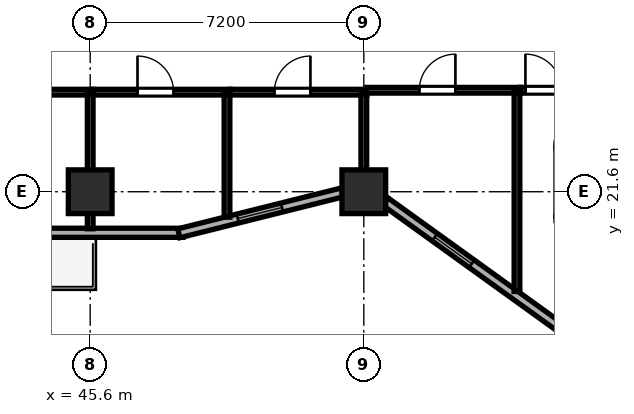
"""IFC4 building model, lengths in metres.
Left out: names, types, materials, properties, quantities, classifications, styles, units other than length and angle.
Written with IfcOpenShell. Run it as: python <this file> out.ifc"""

import sys

from ifc_helpers import new_model, si_unit, direction, frame, frame_2d, origin, origin_2d, place, context, subcontext, project, spatial, rectangle, hollow_rectangle, extrude, element, fill, save


model = new_model("IFC4")
c1 = context("Model", 3, precision=1e-05, world=origin(), true_north=direction((0.0, 1.0)))
c2 = subcontext(c1, "Body", "Model", "MODEL_VIEW")
j1 = project(units=[si_unit("LENGTHUNIT", "METRE"), si_unit("PLANEANGLEUNIT", "RADIAN")], contexts=[c1])
p1 = place(None, origin())
s1 = spatial("IfcSite", under=j1, at=p1, CompositionType="ELEMENT")
p2 = place(p1, origin())
s2 = spatial("IfcBuilding", under=s1, at=p2, CompositionType="ELEMENT")
p3 = place(p2, frame((0.0, 0.0, 47.6)))
s3 = spatial("IfcBuildingStorey", under=s2, at=p3, CompositionType="ELEMENT", Elevation=47.6)
for number, where, z_axis, x_axis in (
    (1, (52.8, 21.6, 0.0), (0.0, 0.0, 1.0), (1.0, 0.0, 0.0)),
    (2, (45.6, 21.6, 0.0), (0.0, 0.0, 1.0), (1.0, 0.0, 0.0)),
):
    element("IfcColumn", number, at=place(p3, frame(where, z_axis=z_axis, x_axis=x_axis)), inside=s3, PredefinedType="COLUMN", context=c2, shape_type="SweptSolid", body=[
        extrude(hollow_rectangle(XDim=1.15, YDim=1.15, WallThickness=0.042, at=origin_2d()), origin(), (0.0, 0.0, 1.0), 3.8),
    ])
p4 = place(p3, frame((28.76, 20.52, 0.0), z_axis=(0.0, 0.0, 1.0), x_axis=(1.0, 0.0, 0.0)))
e3 = element("IfcWall", 3, at=p4, inside=s3, PredefinedType="SOLIDWALL", context=c2, shape_type="SweptSolid", body=[
    extrude(rectangle(XDim=19.281, YDim=0.24, at=frame_2d((9.64, 0.0))), origin(), (0.0, 0.0, 1.0), 3.6),
])
p5 = place(p4, frame((15.64, 0.0, 0.0), z_axis=(0.0, 0.0, 1.0), x_axis=(-1.0, 0.0, 0.0)))
e4 = element("IfcOpeningElement", 4, at=p5, cuts=e3, PredefinedType="OPENING", context=c2, shape_type="SweptSolid", body=[
    extrude(rectangle(XDim=1.2, YDim=2.15, at=frame_2d((0.6, 1.075))), frame((0.0, 0.13, 0.0), z_axis=(0.0, -1.0, 0.0), x_axis=(1.0, 0.0, 0.0)), (0.0, 0.0, 1.0), 0.26),
])
p6 = place(p3, frame((47.932, 20.507, 0.0), z_axis=(0.0, 0.0, 1.0), x_axis=(0.970145739396, 0.242522667667, 0.0)))
e5 = element("IfcWall", 5, at=p6, inside=s3, PredefinedType="SOLIDWALL", context=c2, shape_type="SweptSolid", body=[
    extrude(rectangle(XDim=4.433, YDim=0.24, at=frame_2d((2.217, 0.0))), origin(), (0.0, 0.0, 1.0), 3.097),
])
p7 = place(p6, frame((1.6, 0.0, 0.85)))
e6 = element("IfcOpeningElement", 6, at=p7, cuts=e5, PredefinedType="OPENING", context=c2, shape_type="SweptSolid", body=[
    extrude(rectangle(XDim=1.2, YDim=1.85, at=frame_2d((0.6, 0.925))), frame((0.0, 0.13, 0.0), z_axis=(0.0, -1.0, 0.0), x_axis=(1.0, 0.0, 0.0)), (0.0, 0.0, 1.0), 0.26),
])
p8 = place(p3, frame((53.367, 21.34, 0.0), z_axis=(0.0, 0.0, 1.0), x_axis=(0.811543176492, -0.58429245476, 0.0)))
e7 = element("IfcWall", 7, at=p8, inside=s3, PredefinedType="SOLIDWALL", context=c2, shape_type="SweptSolid", body=[
    extrude(rectangle(XDim=11.531, YDim=0.24, at=frame_2d((5.765, 0.0))), origin(), (0.0, 0.0, 1.0), 3.097),
])
p9 = place(p8, frame((1.6, 0.0, 0.85)))
e8 = element("IfcOpeningElement", 8, at=p9, cuts=e7, PredefinedType="OPENING", context=c2, shape_type="SweptSolid", body=[
    extrude(rectangle(XDim=1.2, YDim=1.85, at=frame_2d((0.6, 0.925))), frame((0.0, 0.13, 0.0), z_axis=(0.0, -1.0, 0.0), x_axis=(1.0, 0.0, 0.0)), (0.0, 0.0, 1.0), 0.26),
])
p10 = place(p8, frame((7.0, 0.0, 0.85)))
e9 = element("IfcOpeningElement", 9, at=p10, cuts=e7, PredefinedType="OPENING", context=c2, shape_type="SweptSolid", body=[
    extrude(rectangle(XDim=1.2, YDim=1.85, at=frame_2d((0.6, 0.925))), frame((0.0, 0.13, 0.0), z_axis=(0.0, -1.0, 0.0), x_axis=(1.0, 0.0, 0.0)), (0.0, 0.0, 1.0), 0.26),
])
p11 = place(p8, frame((9.762, 0.0, 0.85)))
e10 = element("IfcOpeningElement", 10, at=p11, cuts=e7, PredefinedType="OPENING", context=c2, shape_type="SweptSolid", body=[
    extrude(rectangle(XDim=1.2, YDim=1.85, at=frame_2d((0.6, 0.925))), frame((0.0, 0.13, 0.0), z_axis=(0.0, -1.0, 0.0), x_axis=(1.0, 0.0, 0.0)), (0.0, 0.0, 1.0), 0.26),
])
p12 = place(p3, frame((39.882, 24.22, 0.0), z_axis=(0.0, 0.0, 1.0), x_axis=(1.0, 0.0, 0.0)))
e11 = element("IfcWall", 11, at=p12, inside=s3, PredefinedType="PARTITIONING", context=c2, shape_type="SweptSolid", body=[
    extrude(rectangle(XDim=5.798, YDim=0.15, at=frame_2d((2.899, 0.0))), origin(), (0.0, 0.0, 1.0), 3.6),
])
p13 = place(p12, frame((3.213, 0.0, 0.0), z_axis=(0.0, 0.0, 1.0), x_axis=(-1.0, 0.0, 0.0)))
e12 = element("IfcOpeningElement", 12, at=p13, cuts=e11, PredefinedType="OPENING", context=c2, shape_type="SweptSolid", body=[
    extrude(rectangle(XDim=0.95, YDim=2.12, at=frame_2d((0.475, 1.06))), frame((0.0, 0.085, 0.0), z_axis=(0.0, -1.0, 0.0), x_axis=(1.0, 0.0, 0.0)), (0.0, 0.0, 1.0), 0.17),
])
p14 = place(p3, frame((45.6, 20.625, 0.0), z_axis=(0.0, 0.0, 1.0), x_axis=(0.0, 1.0, 0.0)))
e13 = element("IfcWall", 13, at=p14, inside=s3, PredefinedType="PARTITIONING", context=c2, shape_type="SweptSolid", body=[
    extrude(rectangle(XDim=3.535, YDim=0.15, at=frame_2d((1.768, 0.0))), origin(), (0.0, 0.0, 1.0), 2.985),
])
p15 = place(p3, frame((45.682, 24.22, 0.0), z_axis=(0.0, 0.0, 1.0), x_axis=(1.0, 0.0, 0.0)))
e14 = element("IfcWall", 14, at=p15, inside=s3, PredefinedType="PARTITIONING", context=c2, shape_type="SweptSolid", body=[
    extrude(rectangle(XDim=3.598, YDim=0.15, at=frame_2d((1.799, 0.0))), origin(), (0.0, 0.0, 1.0), 3.6),
])
p16 = place(p15, frame((2.113, 0.0, 0.0), z_axis=(0.0, 0.0, 1.0), x_axis=(-1.0, 0.0, 0.0)))
e15 = element("IfcOpeningElement", 15, at=p16, cuts=e14, PredefinedType="OPENING", context=c2, shape_type="SweptSolid", body=[
    extrude(rectangle(XDim=0.95, YDim=2.12, at=frame_2d((0.475, 1.06))), frame((0.0, 0.085, 0.0), z_axis=(0.0, -1.0, 0.0), x_axis=(1.0, 0.0, 0.0)), (0.0, 0.0, 1.0), 0.17),
])
p17 = place(p3, frame((49.2, 20.932, 0.0), z_axis=(0.0, 0.0, 1.0), x_axis=(0.0, 1.0, 0.0)))
e16 = element("IfcWall", 16, at=p17, inside=s3, PredefinedType="PARTITIONING", context=c2, shape_type="SweptSolid", body=[
    extrude(rectangle(XDim=3.228, YDim=0.15, at=frame_2d((1.614, 0.0))), origin(), (0.0, 0.0, 1.0), 3.6),
])
p18 = place(p3, frame((49.282, 24.22, 0.0), z_axis=(0.0, 0.0, 1.0), x_axis=(1.0, 0.0, 0.0)))
e17 = element("IfcWall", 17, at=p18, inside=s3, PredefinedType="PARTITIONING", context=c2, shape_type="SweptSolid", body=[
    extrude(rectangle(XDim=3.598, YDim=0.15, at=frame_2d((1.799, 0.0))), origin(), (0.0, 0.0, 1.0), 3.6),
])
p19 = place(p18, frame((2.113, 0.0, 0.0), z_axis=(0.0, 0.0, 1.0), x_axis=(-1.0, 0.0, 0.0)))
e18 = element("IfcOpeningElement", 18, at=p19, cuts=e17, PredefinedType="OPENING", context=c2, shape_type="SweptSolid", body=[
    extrude(rectangle(XDim=0.95, YDim=2.12, at=frame_2d((0.475, 1.06))), frame((0.0, 0.085, 0.0), z_axis=(0.0, -1.0, 0.0), x_axis=(1.0, 0.0, 0.0)), (0.0, 0.0, 1.0), 0.17),
])
p20 = place(p3, frame((52.8, 21.819, 0.0), z_axis=(0.0, 0.0, 1.0), x_axis=(0.0, 1.0, 0.0)))
e19 = element("IfcWall", 19, at=p20, inside=s3, PredefinedType="PARTITIONING", context=c2, shape_type="SweptSolid", body=[
    extrude(rectangle(XDim=2.341, YDim=0.15, at=frame_2d((1.171, 0.0))), origin(), (0.0, 0.0, 1.0), 3.097),
])
p21 = place(p3, frame((52.882, 24.27, 0.0), z_axis=(0.0, 0.0, 1.0), x_axis=(1.0, 0.0, 0.0)))
e20 = element("IfcWall", 20, at=p21, inside=s3, PredefinedType="PARTITIONING", context=c2, shape_type="SweptSolid", body=[
    extrude(rectangle(XDim=4.028, YDim=0.15, at=frame_2d((2.014, 0.0))), origin(), (0.0, 0.0, 1.0), 3.6),
])
p22 = place(p21, frame((2.328, 0.0, 0.0), z_axis=(0.0, 0.0, 1.0), x_axis=(-1.0, 0.0, 0.0)))
e21 = element("IfcOpeningElement", 21, at=p22, cuts=e20, PredefinedType="OPENING", context=c2, shape_type="SweptSolid", body=[
    extrude(rectangle(XDim=0.95, YDim=2.12, at=frame_2d((0.475, 1.06))), frame((0.0, 0.085, 0.0), z_axis=(0.0, -1.0, 0.0), x_axis=(1.0, 0.0, 0.0)), (0.0, 0.0, 1.0), 0.17),
])
p23 = place(p3, frame((56.83, 18.976, 0.0), z_axis=(0.0, 0.0, 1.0), x_axis=(0.0, 1.0, 0.0)))
e22 = element("IfcWall", 22, at=p23, inside=s3, PredefinedType="PARTITIONING", context=c2, shape_type="SweptSolid", body=[
    extrude(rectangle(XDim=5.234, YDim=0.15, at=frame_2d((2.617, 0.0))), origin(), (0.0, 0.0, 1.0), 3.6),
])
p24 = place(p3, frame((56.912, 24.27, 0.0), z_axis=(0.0, 0.0, 1.0), x_axis=(1.0, 0.0, 0.0)))
e23 = element("IfcWall", 23, at=p24, inside=s3, PredefinedType="PARTITIONING", context=c2, shape_type="SweptSolid", body=[
    extrude(rectangle(XDim=4.158, YDim=0.15, at=frame_2d((2.079, 0.0))), origin(), (0.0, 0.0, 1.0), 3.6),
])
p25 = place(p24, frame((1.09, 0.0, 0.0), z_axis=(0.0, 0.0, 1.0), x_axis=(-1.0, 0.0, 0.0)))
e24 = element("IfcOpeningElement", 24, at=p25, cuts=e23, PredefinedType="OPENING", context=c2, shape_type="SweptSolid", body=[
    extrude(rectangle(XDim=0.95, YDim=2.15, at=frame_2d((0.475, 1.075))), frame((0.0, 0.085, 0.0), z_axis=(0.0, -1.0, 0.0), x_axis=(1.0, 0.0, 0.0)), (0.0, 0.0, 1.0), 0.17),
])
p26 = place(p7, origin())
e25 = element("IfcWindow", 25, at=p26, inside=s3, PartitioningType="SINGLE_PANEL", PredefinedType="WINDOW", context=c2, shape_type="SweptSolid", body=[
    extrude(rectangle(XDim=1.2, YDim=1.85, at=frame_2d((0.6, 0.925))), frame((0.0, 0.03, 0.0), z_axis=(0.0, -1.0, 0.0), x_axis=(1.0, 0.0, 0.0)), (0.0, 0.0, 1.0), 0.06),
])
fill(e6, e25)
p27 = place(p9, origin())
e26 = element("IfcWindow", 26, at=p27, inside=s3, PartitioningType="SINGLE_PANEL", PredefinedType="WINDOW", context=c2, shape_type="SweptSolid", body=[
    extrude(rectangle(XDim=1.2, YDim=1.85, at=frame_2d((0.6, 0.925))), frame((0.0, 0.03, 0.0), z_axis=(0.0, -1.0, 0.0), x_axis=(1.0, 0.0, 0.0)), (0.0, 0.0, 1.0), 0.06),
])
fill(e8, e26)
p28 = place(p16, origin())
e27 = element("IfcDoor", 27, at=p28, inside=s3, OperationType="SINGLE_SWING_RIGHT", PredefinedType="DOOR", context=c2, shape_type="SweptSolid", body=[
    extrude(rectangle(XDim=0.95, YDim=2.12, at=frame_2d((0.475, 1.06))), frame((0.0, 0.025, 0.0), z_axis=(0.0, -1.0, 0.0), x_axis=(1.0, 0.0, 0.0)), (0.0, 0.0, 1.0), 0.05),
])
fill(e15, e27)
p29 = place(p19, origin())
e28 = element("IfcDoor", 28, at=p29, inside=s3, OperationType="SINGLE_SWING_LEFT", PredefinedType="DOOR", context=c2, shape_type="SweptSolid", body=[
    extrude(rectangle(XDim=0.95, YDim=2.12, at=frame_2d((0.475, 1.06))), frame((0.0, 0.025, 0.0), z_axis=(0.0, -1.0, 0.0), x_axis=(1.0, 0.0, 0.0)), (0.0, 0.0, 1.0), 0.05),
])
fill(e18, e28)
p30 = place(p22, origin())
e29 = element("IfcDoor", 29, at=p30, inside=s3, OperationType="SINGLE_SWING_LEFT", PredefinedType="DOOR", context=c2, shape_type="SweptSolid", body=[
    extrude(rectangle(XDim=0.95, YDim=2.12, at=frame_2d((0.475, 1.06))), frame((0.0, 0.025, 0.0), z_axis=(0.0, -1.0, 0.0), x_axis=(1.0, 0.0, 0.0)), (0.0, 0.0, 1.0), 0.05),
])
fill(e21, e29)
p31 = place(p25, origin())
e30 = element("IfcDoor", 30, at=p31, inside=s3, OperationType="SINGLE_SWING_RIGHT", PredefinedType="DOOR", context=c2, shape_type="SweptSolid", body=[
    extrude(rectangle(XDim=0.95, YDim=2.15, at=frame_2d((0.475, 1.075))), frame((0.0, 0.025, 0.0), z_axis=(0.0, -1.0, 0.0), x_axis=(1.0, 0.0, 0.0)), (0.0, 0.0, 1.0), 0.05),
])
fill(e24, e30)
save(model, sys.argv[1])
